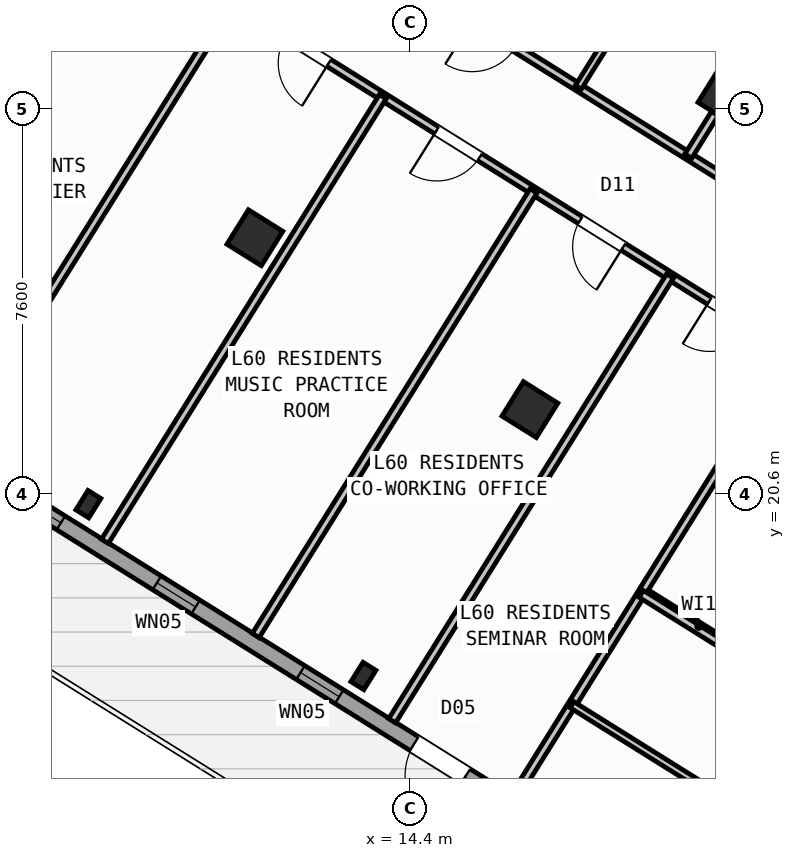
"""IFC4 building model, lengths in metres.
Left out: names, types, materials, properties, quantities, classifications, styles, units other than length and angle.
Written with IfcOpenShell. Run it as: python <this file> out.ifc"""

import sys

from ifc_helpers import new_model, si_unit, direction, frame, frame_2d, origin, origin_2d, place, context, subcontext, project, spatial, rectangle, hollow_rectangle, i_section, extrude, source, transform, mapped, element, fill, save


model = new_model("IFC4")
c1 = context("Model", 3, precision=1e-05, world=origin(), true_north=direction((0.0, 1.0)))
c2 = subcontext(c1, "Body", "Model", "MODEL_VIEW")
j1 = project(units=[si_unit("LENGTHUNIT", "METRE"), si_unit("PLANEANGLEUNIT", "RADIAN")], contexts=[c1])
p1 = place(None, origin())
s1 = spatial("IfcSite", under=j1, at=p1, CompositionType="ELEMENT")
p2 = place(p1, origin())
s2 = spatial("IfcBuilding", under=s1, at=p2, CompositionType="ELEMENT")
p3 = place(p2, frame((0.0, 0.0, 238.5)))
s3 = spatial("IfcBuildingStorey", under=s2, at=p3, CompositionType="ELEMENT", Elevation=238.5)
m1 = source(origin(), c2, "Body", "SweptSolid", [
    extrude(hollow_rectangle(XDim=0.8, YDim=0.8, WallThickness=0.032, at=origin_2d()), origin(), (0.0, 0.0, 1.0), 3.6),
])
for number, where, z_axis, x_axis in (
    (1, (20.632, 28.452, 0.0), (0.0, 0.0, 1.0), (-0.848, 0.53, 0.0)),
    (2, (16.764, 22.261, 0.0), (0.0, 0.0, 1.0), (-0.848, 0.53, 0.0)),
):
    element("IfcColumn", number, at=place(p3, frame(where, z_axis=z_axis, x_axis=x_axis)), inside=s3, PredefinedType="COLUMN", context=c2, shape_type="MappedRepresentation", body=[
        mapped(m1, transform((0.0, 0.0, 0.0), scale=1.0)),
    ])
m2 = source(origin(), c2, "Body", "SweptSolid", [
    extrude(i_section(OverallWidth=0.3, OverallDepth=0.45, WebThickness=0.014, FlangeThickness=0.026, at=origin_2d()), origin(), (0.0, 0.0, 1.0), 3.6),
])
p4 = place(p3, frame((13.478, 17.003, 0.0), z_axis=(0.0, 0.0, 1.0), x_axis=(-0.848048096156, 0.529919264233, 0.0)))
e3 = element("IfcColumn", 3, at=p4, inside=s3, PredefinedType="COLUMN", context=c2, shape_type="MappedRepresentation", body=[
    mapped(m2, transform((0.0, 0.0, 0.0), scale=1.0)),
])
p5 = place(p3, frame((11.336, 25.653, 0.0), z_axis=(0.0, 0.0, 1.0), x_axis=(-0.848048096156, 0.529919264233, 0.0)))
e4 = element("IfcColumn", 4, at=p5, inside=s3, PredefinedType="COLUMN", context=c2, shape_type="MappedRepresentation", body=[
    mapped(m1, transform((0.0, 0.0, 0.0), scale=1.0)),
])
p6 = place(p3, frame((8.051, 20.395, 0.0), z_axis=(0.0, 0.0, 1.0), x_axis=(-0.848048096156, 0.529919264233, 0.0)))
e5 = element("IfcColumn", 5, at=p6, inside=s3, PredefinedType="COLUMN", context=c2, shape_type="MappedRepresentation", body=[
    mapped(m2, transform((0.0, 0.0, 0.0), scale=1.0)),
])
p7 = place(p3, frame((29.268, 6.429, 0.0), z_axis=(0.0, 0.0, 1.0), x_axis=(-0.848049971435, 0.529916263149, 0.0)))
e6 = element("IfcWall", 6, at=p7, inside=s3, PredefinedType="STANDARD", context=c2, shape_type="SweptSolid", body=[
    extrude(rectangle(XDim=31.588, YDim=0.32, at=frame_2d((15.794, 0.0))), origin(), (0.0, 0.0, 1.0), 3.35),
])
p8 = place(p7, frame((16.235, 0.0, 0.0)))
e7 = element("IfcOpeningElement", 7, at=p8, cuts=e6, PredefinedType="OPENING", context=c2, shape_type="SweptSolid", body=[
    extrude(rectangle(XDim=1.2, YDim=2.15, at=frame_2d((0.6, 1.075))), frame((0.0, 0.17, 0.0), z_axis=(0.0, -1.0, 0.0), x_axis=(1.0, 0.0, 0.0)), (0.0, 0.0, 1.0), 0.34),
])
p9 = place(p7, frame((3.859, 0.0, 0.9)))
e8 = element("IfcOpeningElement", 8, at=p9, cuts=e6, PredefinedType="OPENING", context=c2, shape_type="SweptSolid", body=[
    extrude(rectangle(XDim=1.65, YDim=1.45, at=frame_2d((0.825, 0.725))), frame((0.0, 0.17, 0.0), z_axis=(0.0, -1.0, 0.0), x_axis=(1.0, 0.0, 0.0)), (0.0, 0.0, 1.0), 0.34),
])
p10 = place(p7, frame((10.519, 0.0, 0.9)))
e9 = element("IfcOpeningElement", 9, at=p10, cuts=e6, PredefinedType="OPENING", context=c2, shape_type="SweptSolid", body=[
    extrude(rectangle(XDim=1.65, YDim=1.45, at=frame_2d((0.825, 0.725))), frame((0.0, 0.17, 0.0), z_axis=(0.0, -1.0, 0.0), x_axis=(1.0, 0.0, 0.0)), (0.0, 0.0, 1.0), 0.34),
])
p11 = place(p7, frame((19.182, 0.0, 1.0)))
e10 = element("IfcOpeningElement", 10, at=p11, cuts=e6, PredefinedType="OPENING", context=c2, shape_type="SweptSolid", body=[
    extrude(rectangle(XDim=0.9, YDim=1.25, at=frame_2d((0.45, 0.625))), frame((0.0, 0.17, 0.0), z_axis=(0.0, -1.0, 0.0), x_axis=(1.0, 0.0, 0.0)), (0.0, 0.0, 1.0), 0.34),
])
p12 = place(p7, frame((22.524, 0.0, 1.0)))
e11 = element("IfcOpeningElement", 11, at=p12, cuts=e6, PredefinedType="OPENING", context=c2, shape_type="SweptSolid", body=[
    extrude(rectangle(XDim=0.9, YDim=1.25, at=frame_2d((0.45, 0.625))), frame((0.0, 0.17, 0.0), z_axis=(0.0, -1.0, 0.0), x_axis=(1.0, 0.0, 0.0)), (0.0, 0.0, 1.0), 0.34),
])
p13 = place(p7, frame((25.658, 0.0, 0.9)))
e12 = element("IfcOpeningElement", 12, at=p13, cuts=e6, PredefinedType="OPENING", context=c2, shape_type="SweptSolid", body=[
    extrude(rectangle(XDim=1.65, YDim=1.45, at=frame_2d((0.825, 0.725))), frame((0.0, 0.17, 0.0), z_axis=(0.0, -1.0, 0.0), x_axis=(1.0, 0.0, 0.0)), (0.0, 0.0, 1.0), 0.34),
])
p14 = place(p7, frame((29.278, 0.0, 0.9)))
e13 = element("IfcOpeningElement", 13, at=p14, cuts=e6, PredefinedType="OPENING", context=c2, shape_type="SweptSolid", body=[
    extrude(rectangle(XDim=1.35, YDim=1.45, at=frame_2d((0.675, 0.725))), frame((0.0, 0.17, 0.0), z_axis=(0.0, -1.0, 0.0), x_axis=(1.0, 0.0, 0.0)), (0.0, 0.0, 1.0), 0.34),
])
p15 = place(p3, frame((2.415, 23.452, 0.0), z_axis=(0.0, 0.0, 1.0), x_axis=(0.52991049553, 0.848053575387, 0.0)))
e14 = element("IfcWall", 14, at=p15, inside=s3, PredefinedType="STANDARD", context=c2, shape_type="SweptSolid", body=[
    extrude(rectangle(XDim=21.587, YDim=0.32, at=frame_2d((10.794, 0.0))), origin(), (0.0, 0.0, 1.0), 2.875),
])
p16 = place(p15, frame((2.581, 0.0, 0.9)))
e15 = element("IfcOpeningElement", 15, at=p16, cuts=e14, PredefinedType="OPENING", context=c2, shape_type="SweptSolid", body=[
    extrude(rectangle(XDim=1.65, YDim=1.45, at=frame_2d((0.825, 0.725))), frame((0.0, 0.17, 0.0), z_axis=(0.0, -1.0, 0.0), x_axis=(1.0, 0.0, 0.0)), (0.0, 0.0, 1.0), 0.34),
])
p17 = place(p15, frame((7.879, 0.0, 0.9)))
e16 = element("IfcOpeningElement", 16, at=p17, cuts=e14, PredefinedType="OPENING", context=c2, shape_type="SweptSolid", body=[
    extrude(rectangle(XDim=1.35, YDim=1.45, at=frame_2d((0.675, 0.725))), frame((0.0, 0.17, 0.0), z_axis=(0.0, -1.0, 0.0), x_axis=(1.0, 0.0, 0.0)), (0.0, 0.0, 1.0), 0.34),
])
p18 = place(p15, frame((16.954, 0.0, 0.95)))
e17 = element("IfcOpeningElement", 17, at=p18, cuts=e14, PredefinedType="OPENING", context=c2, shape_type="SweptSolid", body=[
    extrude(rectangle(XDim=1.95, YDim=1.35, at=frame_2d((0.975, 0.675))), frame((0.0, 0.17, 0.0), z_axis=(0.0, -1.0, 0.0), x_axis=(1.0, 0.0, 0.0)), (0.0, 0.0, 1.0), 0.34),
])
p19 = place(p3, frame((14.138, 41.825, 0.0), z_axis=(0.0, 0.0, 1.0), x_axis=(0.848046498049, -0.529921821731, 0.0)))
e18 = element("IfcWall", 18, at=p19, inside=s3, PredefinedType="STANDARD", context=c2, shape_type="SweptSolid", body=[
    extrude(rectangle(XDim=31.588, YDim=0.32, at=frame_2d((15.794, 0.0))), origin(), (0.0, 0.0, 1.0), 3.35),
])
p20 = place(p19, frame((9.712, 0.0, 0.0)))
e19 = element("IfcOpeningElement", 19, at=p20, cuts=e18, PredefinedType="OPENING", context=c2, shape_type="SweptSolid", body=[
    extrude(rectangle(XDim=1.05, YDim=2.15, at=frame_2d((0.525, 1.075))), frame((0.0, 0.17, 0.0), z_axis=(0.0, -1.0, 0.0), x_axis=(1.0, 0.0, 0.0)), (0.0, 0.0, 1.0), 0.34),
])
p21 = place(p19, frame((0.841, 0.0, 0.9)))
e20 = element("IfcOpeningElement", 20, at=p21, cuts=e18, PredefinedType="OPENING", context=c2, shape_type="SweptSolid", body=[
    extrude(rectangle(XDim=1.65, YDim=1.45, at=frame_2d((0.825, 0.725))), frame((0.0, 0.17, 0.0), z_axis=(0.0, -1.0, 0.0), x_axis=(1.0, 0.0, 0.0)), (0.0, 0.0, 1.0), 0.34),
])
p22 = place(p19, frame((4.171, 0.0, 1.0)))
e21 = element("IfcOpeningElement", 21, at=p22, cuts=e18, PredefinedType="OPENING", context=c2, shape_type="SweptSolid", body=[
    extrude(rectangle(XDim=0.9, YDim=1.25, at=frame_2d((0.45, 0.625))), frame((0.0, 0.17, 0.0), z_axis=(0.0, -1.0, 0.0), x_axis=(1.0, 0.0, 0.0)), (0.0, 0.0, 1.0), 0.34),
])
p23 = place(p19, frame((13.624, 0.0, 0.95)))
e22 = element("IfcOpeningElement", 22, at=p23, cuts=e18, PredefinedType="OPENING", context=c2, shape_type="SweptSolid", body=[
    extrude(rectangle(XDim=1.95, YDim=1.35, at=frame_2d((0.975, 0.675))), frame((0.0, 0.17, 0.0), z_axis=(0.0, -1.0, 0.0), x_axis=(1.0, 0.0, 0.0)), (0.0, 0.0, 1.0), 0.34),
])
p24 = place(p19, frame((17.129, 0.0, 1.0)))
e23 = element("IfcOpeningElement", 23, at=p24, cuts=e18, PredefinedType="OPENING", context=c2, shape_type="SweptSolid", body=[
    extrude(rectangle(XDim=0.9, YDim=1.25, at=frame_2d((0.45, 0.625))), frame((0.0, 0.17, 0.0), z_axis=(0.0, -1.0, 0.0), x_axis=(1.0, 0.0, 0.0)), (0.0, 0.0, 1.0), 0.34),
])
p25 = place(p19, frame((21.744, 0.0, 0.9)))
e24 = element("IfcOpeningElement", 24, at=p25, cuts=e18, PredefinedType="OPENING", context=c2, shape_type="SweptSolid", body=[
    extrude(rectangle(XDim=1.65, YDim=1.45, at=frame_2d((0.825, 0.725))), frame((0.0, 0.17, 0.0), z_axis=(0.0, -1.0, 0.0), x_axis=(1.0, 0.0, 0.0)), (0.0, 0.0, 1.0), 0.34),
])
p26 = place(p19, frame((27.394, 0.0, 0.9)))
e25 = element("IfcOpeningElement", 25, at=p26, cuts=e18, PredefinedType="OPENING", context=c2, shape_type="SweptSolid", body=[
    extrude(rectangle(XDim=1.65, YDim=1.45, at=frame_2d((0.825, 0.725))), frame((0.0, 0.17, 0.0), z_axis=(0.0, -1.0, 0.0), x_axis=(1.0, 0.0, 0.0)), (0.0, 0.0, 1.0), 0.34),
])
p27 = place(p3, frame((21.206, 17.292, 0.0), z_axis=(0.0, 0.0, 1.0), x_axis=(-0.848050851465, 0.529914854792, 0.0)))
e26 = element("IfcWall", 26, at=p27, inside=s3, PredefinedType="PARTITIONING", context=c2, shape_type="SweptSolid", body=[
    extrude(rectangle(XDim=2.61, YDim=0.16, at=frame_2d((1.305, 0.0))), origin(), (0.0, 0.0, 1.0), 3.34),
])
p28 = place(p3, frame((21.938, 23.391, 0.0), z_axis=(0.0, 0.0, 1.0), x_axis=(-0.529924725692, -0.848044683434, 0.0)))
e27 = element("IfcWall", 27, at=p28, inside=s3, PredefinedType="PARTITIONING", context=c2, shape_type="SweptSolid", body=[
    extrude(rectangle(XDim=10.35, YDim=0.16, at=frame_2d((5.175, 0.0))), origin(), (0.0, 0.0, 1.0), 3.34),
])
p29 = place(p3, frame((23.104, 25.256, 0.0), z_axis=(0.0, 0.0, 1.0), x_axis=(-0.848041752158, 0.529929416617, 0.0)))
e28 = element("IfcWall", 28, at=p29, inside=s3, PredefinedType="PARTITIONING", context=c2, shape_type="SweptSolid", body=[
    extrude(rectangle(XDim=16.73, YDim=0.16, at=frame_2d((8.365, 0.0))), origin(), (0.0, 0.0, 1.0), 3.34),
])
p30 = place(p29, frame((1.395, 0.0, 0.0)))
e29 = element("IfcOpeningElement", 29, at=p30, cuts=e28, PredefinedType="OPENING", context=c2, shape_type="SweptSolid", body=[
    extrude(rectangle(XDim=1.0, YDim=2.1, at=frame_2d((0.5, 1.05))), frame((0.0, 0.09, 0.0), z_axis=(0.0, -1.0, 0.0), x_axis=(1.0, 0.0, 0.0)), (0.0, 0.0, 1.0), 0.18),
])
p31 = place(p29, frame((7.82, 0.0, 0.0)))
e30 = element("IfcOpeningElement", 30, at=p31, cuts=e28, PredefinedType="OPENING", context=c2, shape_type="SweptSolid", body=[
    extrude(rectangle(XDim=1.0, YDim=2.1, at=frame_2d((0.5, 1.05))), frame((0.0, 0.09, 0.0), z_axis=(0.0, -1.0, 0.0), x_axis=(1.0, 0.0, 0.0)), (0.0, 0.0, 1.0), 0.18),
])
p32 = place(p29, frame((11.14, 0.0, 0.0)))
e31 = element("IfcOpeningElement", 31, at=p32, cuts=e28, PredefinedType="OPENING", context=c2, shape_type="SweptSolid", body=[
    extrude(rectangle(XDim=1.0, YDim=2.1, at=frame_2d((0.5, 1.05))), frame((0.0, 0.09, 0.0), z_axis=(0.0, -1.0, 0.0), x_axis=(1.0, 0.0, 0.0)), (0.0, 0.0, 1.0), 0.18),
])
p33 = place(p3, frame((21.938, 23.391, 0.0), z_axis=(0.0, 0.0, 1.0), x_axis=(-0.848045850158, 0.529922858565, 0.0)))
e32 = element("IfcWall", 32, at=p33, inside=s3, PredefinedType="PARTITIONING", context=c2, shape_type="SweptSolid", body=[
    extrude(rectangle(XDim=16.73, YDim=0.16, at=frame_2d((8.365, 0.0))), origin(), (0.0, 0.0, 1.0), 3.34),
])
p34 = place(p33, frame((0.92, 0.0, 0.0)))
e33 = element("IfcOpeningElement", 33, at=p34, cuts=e32, PredefinedType="OPENING", context=c2, shape_type="SweptSolid", body=[
    extrude(rectangle(XDim=1.0, YDim=2.1, at=frame_2d((0.5, 1.05))), frame((0.0, 0.09, 0.0), z_axis=(0.0, -1.0, 0.0), x_axis=(1.0, 0.0, 0.0)), (0.0, 0.0, 1.0), 0.18),
])
p35 = place(p33, frame((3.928, 0.0, 0.0)))
e34 = element("IfcOpeningElement", 34, at=p35, cuts=e32, PredefinedType="OPENING", context=c2, shape_type="SweptSolid", body=[
    extrude(rectangle(XDim=1.0, YDim=2.1, at=frame_2d((0.5, 1.05))), frame((0.0, 0.09, 0.0), z_axis=(0.0, -1.0, 0.0), x_axis=(1.0, 0.0, 0.0)), (0.0, 0.0, 1.0), 0.18),
])
p36 = place(p33, frame((7.271, 0.0, 0.0)))
e35 = element("IfcOpeningElement", 35, at=p36, cuts=e32, PredefinedType="OPENING", context=c2, shape_type="SweptSolid", body=[
    extrude(rectangle(XDim=1.0, YDim=2.1, at=frame_2d((0.5, 1.05))), frame((0.0, 0.09, 0.0), z_axis=(0.0, -1.0, 0.0), x_axis=(1.0, 0.0, 0.0)), (0.0, 0.0, 1.0), 0.18),
])
p37 = place(p33, frame((10.78, 0.0, 0.0)))
e36 = element("IfcOpeningElement", 36, at=p37, cuts=e32, PredefinedType="OPENING", context=c2, shape_type="SweptSolid", body=[
    extrude(rectangle(XDim=1.0, YDim=2.1, at=frame_2d((0.5, 1.05))), frame((0.0, 0.09, 0.0), z_axis=(0.0, -1.0, 0.0), x_axis=(1.0, 0.0, 0.0)), (0.0, 0.0, 1.0), 0.18),
])
p38 = place(p33, frame((14.372, 0.0, 0.0)))
e37 = element("IfcOpeningElement", 37, at=p38, cuts=e32, PredefinedType="OPENING", context=c2, shape_type="SweptSolid", body=[
    extrude(rectangle(XDim=1.0, YDim=2.1, at=frame_2d((0.5, 1.05))), frame((0.0, 0.09, 0.0), z_axis=(0.0, -1.0, 0.0), x_axis=(1.0, 0.0, 0.0)), (0.0, 0.0, 1.0), 0.18),
])
p39 = place(p3, frame((19.529, 24.896, 0.0), z_axis=(0.0, 0.0, 1.0), x_axis=(-0.529914125013, -0.848051307476, 0.0)))
e38 = element("IfcWall", 38, at=p39, inside=s3, PredefinedType="PARTITIONING", context=c2, shape_type="SweptSolid", body=[
    extrude(rectangle(XDim=10.35, YDim=0.16, at=frame_2d((5.175, 0.0))), origin(), (0.0, 0.0, 1.0), 3.34),
])
p40 = place(p3, frame((16.837, 26.579, 0.0), z_axis=(0.0, 0.0, 1.0), x_axis=(-0.529941690036, -0.848034082547, 0.0)))
e39 = element("IfcWall", 39, at=p40, inside=s3, PredefinedType="PARTITIONING", context=c2, shape_type="SweptSolid", body=[
    extrude(rectangle(XDim=10.35, YDim=0.16, at=frame_2d((5.175, 0.0))), origin(), (0.0, 0.0, 1.0), 3.025),
])
p41 = place(p3, frame((13.861, 28.438, 0.0), z_axis=(0.0, 0.0, 1.0), x_axis=(-0.529931089283, -0.848040706931, 0.0)))
e40 = element("IfcWall", 40, at=p41, inside=s3, PredefinedType="PARTITIONING", context=c2, shape_type="SweptSolid", body=[
    extrude(rectangle(XDim=10.35, YDim=0.16, at=frame_2d((5.175, 0.0))), origin(), (0.0, 0.0, 1.0), 3.34),
])
p42 = place(p3, frame((10.885, 30.298, 0.0), z_axis=(0.0, 0.0, 1.0), x_axis=(-0.529924725692, -0.848044683434, 0.0)))
e41 = element("IfcWall", 41, at=p42, inside=s3, PredefinedType="PARTITIONING", context=c2, shape_type="SweptSolid", body=[
    extrude(rectangle(XDim=10.35, YDim=0.16, at=frame_2d((5.175, 0.0))), origin(), (0.0, 0.0, 1.0), 3.34),
])
p43 = place(p3, frame((20.414, 28.103, 0.0), z_axis=(0.0, 0.0, 1.0), x_axis=(-0.529998940003, -0.847998304005, 0.0)))
e42 = element("IfcWall", 42, at=p43, inside=s3, PredefinedType="PARTITIONING", context=c2, shape_type="SweptSolid", body=[
    extrude(rectangle(XDim=0.988, YDim=0.16, at=frame_2d((0.494, 0.0))), origin(), (0.0, 0.0, 1.0), 2.875),
])
p44 = place(p3, frame((19.616, 31.657, 0.0), z_axis=(0.0, 0.0, 1.0), x_axis=(-0.529876336437, -0.84807491891, 0.0)))
e43 = element("IfcWall", 43, at=p44, inside=s3, PredefinedType="PLUMBINGWALL", context=c2, shape_type="SweptSolid", body=[
    extrude(rectangle(XDim=3.58, YDim=0.14, at=frame_2d((1.79, 0.0))), origin(), (0.0, 0.0, 1.0), 3.34),
])
p45 = place(p44, frame((1.4, 0.0, 0.0)))
e44 = element("IfcOpeningElement", 44, at=p45, cuts=e43, PredefinedType="OPENING", context=c2, shape_type="SweptSolid", body=[
    extrude(rectangle(XDim=0.78, YDim=2.05, at=frame_2d((0.39, 1.025))), frame((0.0, 0.08, 0.0), z_axis=(0.0, -1.0, 0.0), x_axis=(1.0, 0.0, 0.0)), (0.0, 0.0, 1.0), 0.16),
])
p46 = place(p3, frame((32.164, 10.374, 0.0), z_axis=(0.0, 0.0, 1.0), x_axis=(-0.848044107957, 0.529925646633, 0.0)))
e45 = element("IfcWall", 45, at=p46, inside=s3, PredefinedType="PARTITIONING", context=c2, shape_type="SweptSolid", body=[
    extrude(rectangle(XDim=15.57, YDim=0.16, at=frame_2d((7.785, 0.0))), origin(), (0.0, 0.0, 1.0), 3.34),
])
p47 = place(p46, frame((10.83, 0.0, 0.0)))
e46 = element("IfcOpeningElement", 46, at=p47, cuts=e45, PredefinedType="OPENING", context=c2, shape_type="SweptSolid", body=[
    extrude(rectangle(XDim=1.0, YDim=2.1, at=frame_2d((0.5, 1.05))), frame((0.0, 0.09, 0.0), z_axis=(0.0, -1.0, 0.0), x_axis=(1.0, 0.0, 0.0)), (0.0, 0.0, 1.0), 0.18),
])
p48 = place(p3, frame((29.72, 8.859, 0.0), z_axis=(0.0, 0.0, 1.0), x_axis=(-0.848049134363, 0.529917602752, 0.0)))
e47 = element("IfcWall", 47, at=p48, inside=s3, PredefinedType="PLUMBINGWALL", context=c2, shape_type="SweptSolid", body=[
    extrude(rectangle(XDim=14.3, YDim=0.14, at=frame_2d((7.15, 0.0))), origin(), (0.0, 0.0, 1.0), 3.34),
])
p49 = place(p48, frame((9.57, 0.0, 0.0)))
e48 = element("IfcOpeningElement", 48, at=p49, cuts=e47, PredefinedType="OPENING", context=c2, shape_type="SweptSolid", body=[
    extrude(rectangle(XDim=0.92, YDim=2.08, at=frame_2d((0.46, 1.04))), frame((0.0, 0.08, 0.0), z_axis=(0.0, -1.0, 0.0), x_axis=(1.0, 0.0, 0.0)), (0.0, 0.0, 1.0), 0.16),
])
m3 = source(origin(), c2, "Body", "SweptSolid", [
    extrude(rectangle(XDim=1.2, YDim=2.15, at=frame_2d((0.6, 1.075))), frame((0.0, 0.025, 0.0), z_axis=(0.0, -1.0, 0.0), x_axis=(1.0, 0.0, 0.0)), (0.0, 0.0, 1.0), 0.05),
])
p50 = place(p8, origin())
e49 = element("IfcDoor", 49, at=p50, inside=s3, OperationType="SINGLE_SWING_LEFT", PredefinedType="DOOR", context=c2, shape_type="MappedRepresentation", body=[
    mapped(m3, transform((0.0, 0.0, 0.0), scale=1.0)),
])
fill(e7, e49)
m4 = source(origin(), c2, "Body", "SweptSolid", [
    extrude(rectangle(XDim=0.9, YDim=1.25, at=frame_2d((0.45, 0.625))), frame((0.0, 0.03, 0.0), z_axis=(0.0, -1.0, 0.0), x_axis=(1.0, 0.0, 0.0)), (0.0, 0.0, 1.0), 0.06),
])
p51 = place(p11, origin())
e50 = element("IfcWindow", 50, at=p51, inside=s3, PartitioningType="SINGLE_PANEL", PredefinedType="WINDOW", context=c2, shape_type="MappedRepresentation", body=[
    mapped(m4, transform((0.0, 0.0, 0.0), scale=1.0)),
])
fill(e10, e50)
p52 = place(p12, origin())
e51 = element("IfcWindow", 51, at=p52, inside=s3, PartitioningType="SINGLE_PANEL", PredefinedType="WINDOW", context=c2, shape_type="MappedRepresentation", body=[
    mapped(m4, transform((0.0, 0.0, 0.0), scale=1.0)),
])
fill(e11, e51)
m5 = source(origin(), c2, "Body", "SweptSolid", [
    extrude(rectangle(XDim=1.65, YDim=1.45, at=frame_2d((0.825, 0.725))), frame((0.0, 0.03, 0.0), z_axis=(0.0, -1.0, 0.0), x_axis=(1.0, 0.0, 0.0)), (0.0, 0.0, 1.0), 0.06),
])
p53 = place(p13, origin())
e52 = element("IfcWindow", 52, at=p53, inside=s3, PartitioningType="SINGLE_PANEL", PredefinedType="WINDOW", context=c2, shape_type="MappedRepresentation", body=[
    mapped(m5, transform((0.0, 0.0, 0.0), scale=1.0)),
])
fill(e12, e52)
m6 = source(origin(), c2, "Body", "SweptSolid", [
    extrude(rectangle(XDim=1.0, YDim=2.1, at=frame_2d((0.5, 1.05))), frame((0.0, 0.025, 0.0), z_axis=(0.0, -1.0, 0.0), x_axis=(1.0, 0.0, 0.0)), (0.0, 0.0, 1.0), 0.05),
])
p54 = place(p34, origin())
e53 = element("IfcDoor", 53, at=p54, inside=s3, OperationType="SINGLE_SWING_RIGHT", PredefinedType="DOOR", context=c2, shape_type="MappedRepresentation", body=[
    mapped(m6, transform((0.0, 0.0, 0.0), scale=1.0)),
])
fill(e33, e53)
p55 = place(p35, origin())
e54 = element("IfcDoor", 54, at=p55, inside=s3, OperationType="SINGLE_SWING_LEFT", PredefinedType="DOOR", context=c2, shape_type="MappedRepresentation", body=[
    mapped(m6, transform((0.0, 0.0, 0.0), scale=1.0)),
])
fill(e34, e54)
p56 = place(p36, origin())
e55 = element("IfcDoor", 55, at=p56, inside=s3, OperationType="SINGLE_SWING_RIGHT", PredefinedType="DOOR", context=c2, shape_type="MappedRepresentation", body=[
    mapped(m6, transform((0.0, 0.0, 0.0), scale=1.0)),
])
fill(e35, e55)
p57 = place(p37, origin())
e56 = element("IfcDoor", 56, at=p57, inside=s3, OperationType="SINGLE_SWING_LEFT", PredefinedType="DOOR", context=c2, shape_type="MappedRepresentation", body=[
    mapped(m6, transform((0.0, 0.0, 0.0), scale=1.0)),
])
fill(e36, e56)
save(model, sys.argv[1])
